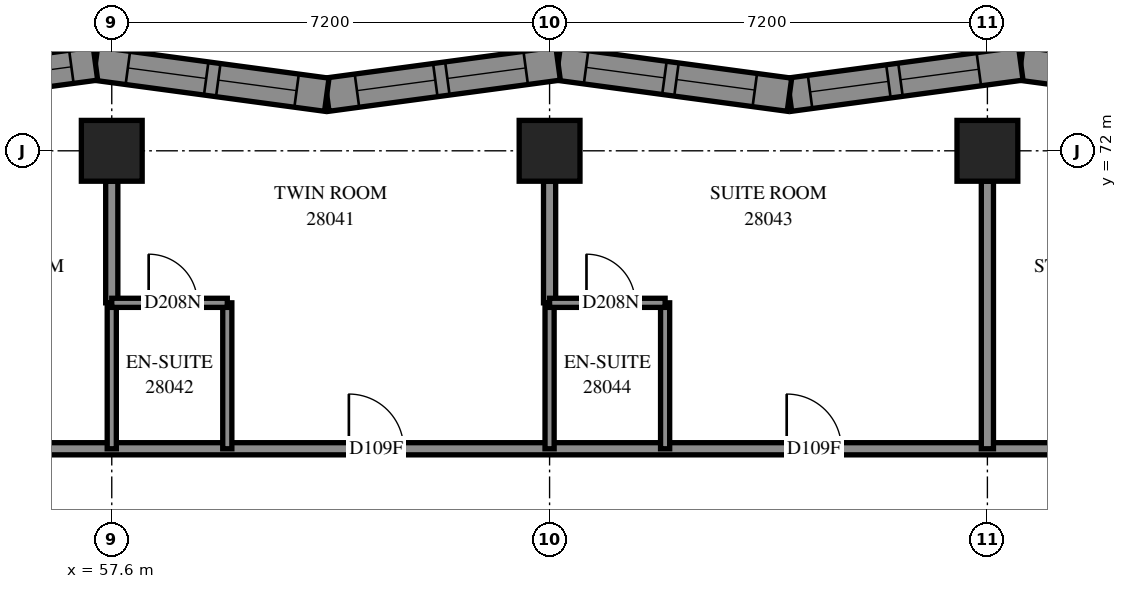
"""IFC4 building model, lengths in metres.
Left out: names, types, materials, properties, quantities, classifications, styles, units other than length and angle.
Written with IfcOpenShell. Run it as: python <this file> out.ifc"""

import sys

from ifc_helpers import new_model, si_unit, direction, frame, frame_2d, origin, origin_2d, place, context, subcontext, project, spatial, polyline, rectangle, outline, extrude, element, fill, save


model = new_model("IFC4")
c1 = context("Model", 3, precision=1e-05, world=origin(), true_north=direction((0.0, 1.0)))
c2 = subcontext(c1, "Body", "Model", "MODEL_VIEW")
j1 = project(units=[si_unit("LENGTHUNIT", "METRE"), si_unit("PLANEANGLEUNIT", "RADIAN")], contexts=[c1])
p1 = place(None, origin())
s1 = spatial("IfcSite", under=j1, at=p1, CompositionType="ELEMENT")
p2 = place(p1, origin())
s2 = spatial("IfcBuilding", under=s1, at=p2, CompositionType="ELEMENT")
p3 = place(p2, frame((0.0, 0.0, 105.0)))
s3 = spatial("IfcBuildingStorey", under=s2, at=p3, CompositionType="ELEMENT", Elevation=105.0)
for number, where, z_axis, x_axis in (
    (1, (57.6, 72.0, 0.0), (0.0, 0.0, 1.0), (1.0, 0.0, 0.0)),
    (2, (64.8, 72.0, 0.0), (0.0, 0.0, 1.0), (1.0, 0.0, 0.0)),
    (3, (72.0, 72.0, 0.0), (0.0, 0.0, 1.0), (1.0, 0.0, 0.0)),
):
    element("IfcColumn", number, at=place(p3, frame(where, z_axis=z_axis, x_axis=x_axis)), inside=s3, PredefinedType="COLUMN", context=c2, shape_type="SweptSolid", body=[
        extrude(rectangle(XDim=1.0, YDim=1.0, at=origin_2d()), origin(), (0.0, 0.0, 1.0), 3.1),
    ])
p4 = place(p3, frame((76.374, 72.92, 0.0), z_axis=(0.0, 0.0, 1.0), x_axis=(-0.9910665233, 0.1333684607, 0.0)))
e4 = element("IfcWall", 4, at=p4, inside=s3, PredefinedType="SOLIDWALL", context=c2, shape_type="SweptSolid", body=[
    extrude(outline(polyline([(0.058, -0.275), (3.897, -0.275), (3.823, 0.275), (-0.058, 0.275), (0.058, -0.275)])), origin(), (0.0, 0.0, 1.0), 3.1),
])
p5 = place(p4, frame((1.602, 0.0, 0.5)))
e5 = element("IfcOpeningElement", 5, at=p5, cuts=e4, PredefinedType="OPENING", context=c2, shape_type="SweptSolid", body=[
    extrude(rectangle(XDim=1.2, YDim=2.45, at=frame_2d((0.6, 1.225))), frame((0.0, 0.285, 0.0), z_axis=(0.0, -1.0, 0.0), x_axis=(1.0, 0.0, 0.0)), (0.0, 0.0, 1.0), 0.57),
])
p6 = place(p3, frame((72.549, 73.434, 0.0), z_axis=(0.0, 0.0, 1.0), x_axis=(-0.9910651652, -0.1333785524, 0.0)))
e6 = element("IfcWall", 6, at=p6, inside=s3, PredefinedType="SOLIDWALL", context=c2, shape_type="SweptSolid", body=[
    extrude(outline(polyline([(-0.037, -0.275), (3.802, -0.275), (3.876, 0.275), (0.037, 0.275), (-0.037, -0.275)])), origin(), (0.0, 0.0, 1.0), 3.1),
])
p7 = place(p6, frame((0.696, 0.0, 0.5)))
e7 = element("IfcOpeningElement", 7, at=p7, cuts=e6, PredefinedType="OPENING", context=c2, shape_type="SweptSolid", body=[
    extrude(rectangle(XDim=1.3, YDim=2.45, at=frame_2d((0.65, 1.225))), frame((0.0, 0.285, 0.0), z_axis=(0.0, -1.0, 0.0), x_axis=(1.0, 0.0, 0.0)), (0.0, 0.0, 1.0), 0.57),
])
p8 = place(p6, frame((2.196, 0.0, 0.5)))
e8 = element("IfcOpeningElement", 8, at=p8, cuts=e6, PredefinedType="OPENING", context=c2, shape_type="SweptSolid", body=[
    extrude(rectangle(XDim=1.3, YDim=2.45, at=frame_2d((0.65, 1.225))), frame((0.0, 0.285, 0.0), z_axis=(0.0, -1.0, 0.0), x_axis=(1.0, 0.0, 0.0)), (0.0, 0.0, 1.0), 0.57),
])
p9 = place(p3, frame((68.745, 72.922, 0.0), z_axis=(0.0, 0.0, 1.0), x_axis=(-0.9910647018, 0.133381996, 0.0)))
e9 = element("IfcWall", 9, at=p9, inside=s3, PredefinedType="SOLIDWALL", context=c2, shape_type="SweptSolid", body=[
    extrude(outline(polyline([(0.037, -0.275), (3.876, -0.275), (3.802, 0.275), (-0.037, 0.275), (0.037, -0.275)])), origin(), (0.0, 0.0, 1.0), 3.1),
])
p10 = place(p9, frame((0.575, 0.0, 0.5)))
e10 = element("IfcOpeningElement", 10, at=p10, cuts=e9, PredefinedType="OPENING", context=c2, shape_type="SweptSolid", body=[
    extrude(rectangle(XDim=1.3, YDim=2.45, at=frame_2d((0.65, 1.225))), frame((0.0, 0.285, 0.0), z_axis=(0.0, -1.0, 0.0), x_axis=(1.0, 0.0, 0.0)), (0.0, 0.0, 1.0), 0.57),
])
p11 = place(p9, frame((2.075, 0.0, 0.5)))
e11 = element("IfcOpeningElement", 11, at=p11, cuts=e9, PredefinedType="OPENING", context=c2, shape_type="SweptSolid", body=[
    extrude(rectangle(XDim=1.3, YDim=2.45, at=frame_2d((0.65, 1.225))), frame((0.0, 0.285, 0.0), z_axis=(0.0, -1.0, 0.0), x_axis=(1.0, 0.0, 0.0)), (0.0, 0.0, 1.0), 0.57),
])
p12 = place(p3, frame((64.94, 73.434, 0.0), z_axis=(0.0, 0.0, 1.0), x_axis=(-0.9910651652, -0.1333785524, 0.0)))
e12 = element("IfcWall", 12, at=p12, inside=s3, PredefinedType="SOLIDWALL", context=c2, shape_type="SweptSolid", body=[
    extrude(outline(polyline([(-0.037, -0.275), (3.802, -0.275), (3.876, 0.275), (0.037, 0.275), (-0.037, -0.275)])), origin(), (0.0, 0.0, 1.0), 3.1),
])
p13 = place(p12, frame((0.538, 0.0, 0.5)))
e13 = element("IfcOpeningElement", 13, at=p13, cuts=e12, PredefinedType="OPENING", context=c2, shape_type="SweptSolid", body=[
    extrude(rectangle(XDim=1.3, YDim=2.45, at=frame_2d((0.65, 1.225))), frame((0.0, 0.285, 0.0), z_axis=(0.0, -1.0, 0.0), x_axis=(1.0, 0.0, 0.0)), (0.0, 0.0, 1.0), 0.57),
])
p14 = place(p12, frame((2.038, 0.0, 0.5)))
e14 = element("IfcOpeningElement", 14, at=p14, cuts=e12, PredefinedType="OPENING", context=c2, shape_type="SweptSolid", body=[
    extrude(rectangle(XDim=1.3, YDim=2.45, at=frame_2d((0.65, 1.225))), frame((0.0, 0.285, 0.0), z_axis=(0.0, -1.0, 0.0), x_axis=(1.0, 0.0, 0.0)), (0.0, 0.0, 1.0), 0.57),
])
p15 = place(p3, frame((61.136, 72.922, 0.0), z_axis=(0.0, 0.0, 1.0), x_axis=(-0.9910647018, 0.133381996, 0.0)))
e15 = element("IfcWall", 15, at=p15, inside=s3, PredefinedType="SOLIDWALL", context=c2, shape_type="SweptSolid", body=[
    extrude(outline(polyline([(0.037, -0.275), (3.876, -0.275), (3.802, 0.275), (-0.037, 0.275), (0.037, -0.275)])), origin(), (0.0, 0.0, 1.0), 3.1),
])
p16 = place(p15, frame((0.501, 0.0, 0.5)))
e16 = element("IfcOpeningElement", 16, at=p16, cuts=e15, PredefinedType="OPENING", context=c2, shape_type="SweptSolid", body=[
    extrude(rectangle(XDim=1.3, YDim=2.45, at=frame_2d((0.65, 1.225))), frame((0.0, 0.285, 0.0), z_axis=(0.0, -1.0, 0.0), x_axis=(1.0, 0.0, 0.0)), (0.0, 0.0, 1.0), 0.57),
])
p17 = place(p15, frame((2.001, 0.0, 0.5)))
e17 = element("IfcOpeningElement", 17, at=p17, cuts=e15, PredefinedType="OPENING", context=c2, shape_type="SweptSolid", body=[
    extrude(rectangle(XDim=1.3, YDim=2.45, at=frame_2d((0.65, 1.225))), frame((0.0, 0.285, 0.0), z_axis=(0.0, -1.0, 0.0), x_axis=(1.0, 0.0, 0.0)), (0.0, 0.0, 1.0), 0.57),
])
p18 = place(p3, frame((57.332, 73.434, 0.0), z_axis=(0.0, 0.0, 1.0), x_axis=(-0.9910651652, -0.1333785524, 0.0)))
e18 = element("IfcWall", 18, at=p18, inside=s3, PredefinedType="SOLIDWALL", context=c2, shape_type="SweptSolid", body=[
    extrude(outline(polyline([(-0.037, -0.275), (3.802, -0.275), (3.876, 0.275), (0.037, 0.275), (-0.037, -0.275)])), origin(), (0.0, 0.0, 1.0), 3.1),
])
p19 = place(p18, frame((0.399, 0.0, 0.5)))
e19 = element("IfcOpeningElement", 19, at=p19, cuts=e18, PredefinedType="OPENING", context=c2, shape_type="SweptSolid", body=[
    extrude(rectangle(XDim=1.3, YDim=2.45, at=frame_2d((0.65, 1.225))), frame((0.0, 0.285, 0.0), z_axis=(0.0, -1.0, 0.0), x_axis=(1.0, 0.0, 0.0)), (0.0, 0.0, 1.0), 0.57),
])
p20 = place(p18, frame((1.899, 0.0, 0.5)))
e20 = element("IfcOpeningElement", 20, at=p20, cuts=e18, PredefinedType="OPENING", context=c2, shape_type="SweptSolid", body=[
    extrude(rectangle(XDim=1.3, YDim=2.45, at=frame_2d((0.65, 1.225))), frame((0.0, 0.285, 0.0), z_axis=(0.0, -1.0, 0.0), x_axis=(1.0, 0.0, 0.0)), (0.0, 0.0, 1.0), 0.57),
])
p21 = place(p3, frame((55.3, 67.1, 0.0), z_axis=(0.0, 0.0, 1.0), x_axis=(1.0, 0.0, 0.0)))
e21 = element("IfcWall", 21, at=p21, inside=s3, PredefinedType="PARTITIONING", context=c2, shape_type="SweptSolid", body=[
    extrude(rectangle(XDim=19.0, YDim=0.2, at=frame_2d((9.5, 0.0))), origin(), (0.0, 0.0, 1.0), 3.1),
])
p22 = place(p21, frame((6.199, 0.0, 0.0)))
e22 = element("IfcOpeningElement", 22, at=p22, cuts=e21, PredefinedType="OPENING", context=c2, shape_type="SweptSolid", body=[
    extrude(rectangle(XDim=0.9, YDim=2.1, at=frame_2d((0.45, 1.05))), frame((0.0, 0.11, 0.0), z_axis=(0.0, -1.0, 0.0), x_axis=(1.0, 0.0, 0.0)), (0.0, 0.0, 1.0), 0.22),
])
p23 = place(p21, frame((13.399, 0.0, 0.0)))
e23 = element("IfcOpeningElement", 23, at=p23, cuts=e21, PredefinedType="OPENING", context=c2, shape_type="SweptSolid", body=[
    extrude(rectangle(XDim=0.9, YDim=2.1, at=frame_2d((0.45, 1.05))), frame((0.0, 0.11, 0.0), z_axis=(0.0, -1.0, 0.0), x_axis=(1.0, 0.0, 0.0)), (0.0, 0.0, 1.0), 0.22),
])
p24 = place(p3, frame((72.0, 67.1, 0.0), z_axis=(0.0, 0.0, 1.0), x_axis=(0.0, 1.0, 0.0)))
e24 = element("IfcWall", 24, at=p24, inside=s3, PredefinedType="PARTITIONING", context=c2, shape_type="SweptSolid", body=[
    extrude(rectangle(XDim=4.4, YDim=0.2, at=frame_2d((2.2, 0.0))), origin(), (0.0, 0.0, 1.0), 3.1),
])
for number, where, z_axis, x_axis in (
    (25, (59.5, 67.1, 0.0), (0.0, 0.0, 1.0), (0.0, 1.0, 0.0)),
    (26, (57.6, 67.1, 0.0), (0.0, 0.0, 1.0), (0.0, 1.0, 0.0)),
    (27, (64.8, 67.1, 0.0), (0.0, 0.0, 1.0), (0.0, 1.0, 0.0)),
    (28, (66.7, 67.1, 0.0), (0.0, 0.0, 1.0), (0.0, 1.0, 0.0)),
):
    element("IfcWall", number, at=place(p3, frame(where, z_axis=z_axis, x_axis=x_axis)), inside=s3, PredefinedType="PARTITIONING", context=c2, shape_type="SweptSolid", body=[
        extrude(rectangle(XDim=2.4, YDim=0.15, at=frame_2d((1.2, 0.0))), origin(), (0.0, 0.0, 1.0), 3.1),
    ])
for number, where, z_axis, x_axis in (
    (29, (57.6, 69.5, 0.0), (0.0, 0.0, 1.0), (0.0, 1.0, 0.0)),
    (30, (64.8, 69.5, 0.0), (0.0, 0.0, 1.0), (0.0, 1.0, 0.0)),
):
    element("IfcWall", number, at=place(p3, frame(where, z_axis=z_axis, x_axis=x_axis)), inside=s3, PredefinedType="PARTITIONING", context=c2, shape_type="SweptSolid", body=[
        extrude(rectangle(XDim=2.0, YDim=0.2, at=frame_2d((1.0, 0.0))), origin(), (0.0, 0.0, 1.0), 3.1),
    ])
p25 = place(p3, frame((64.8, 69.5, 0.0), z_axis=(0.0, 0.0, 1.0), x_axis=(1.0, 0.0, 0.0)))
e31 = element("IfcWall", 31, at=p25, inside=s3, PredefinedType="PARTITIONING", context=c2, shape_type="SweptSolid", body=[
    extrude(rectangle(XDim=1.9, YDim=0.15, at=frame_2d((0.95, 0.0))), origin(), (0.0, 0.0, 1.0), 3.1),
])
p26 = place(p25, frame((0.607, 0.0, 0.0)))
e32 = element("IfcOpeningElement", 32, at=p26, cuts=e31, PredefinedType="OPENING", context=c2, shape_type="SweptSolid", body=[
    extrude(rectangle(XDim=0.8, YDim=2.1, at=frame_2d((0.4, 1.05))), frame((0.0, 0.085, 0.0), z_axis=(0.0, -1.0, 0.0), x_axis=(1.0, 0.0, 0.0)), (0.0, 0.0, 1.0), 0.17),
])
p27 = place(p3, frame((57.6, 69.5, 0.0), z_axis=(0.0, 0.0, 1.0), x_axis=(1.0, 0.0, 0.0)))
e33 = element("IfcWall", 33, at=p27, inside=s3, PredefinedType="PARTITIONING", context=c2, shape_type="SweptSolid", body=[
    extrude(rectangle(XDim=1.9, YDim=0.15, at=frame_2d((0.95, 0.0))), origin(), (0.0, 0.0, 1.0), 3.1),
])
p28 = place(p27, frame((0.607, 0.0, 0.0)))
e34 = element("IfcOpeningElement", 34, at=p28, cuts=e33, PredefinedType="OPENING", context=c2, shape_type="SweptSolid", body=[
    extrude(rectangle(XDim=0.8, YDim=2.1, at=frame_2d((0.4, 1.05))), frame((0.0, 0.085, 0.0), z_axis=(0.0, -1.0, 0.0), x_axis=(1.0, 0.0, 0.0)), (0.0, 0.0, 1.0), 0.17),
])
p29 = place(p7, origin())
e35 = element("IfcWindow", 35, at=p29, inside=s3, PartitioningType="SINGLE_PANEL", PredefinedType="WINDOW", context=c2, shape_type="SweptSolid", body=[
    extrude(rectangle(XDim=1.3, YDim=2.45, at=frame_2d((0.65, 1.225))), frame((0.0, 0.155, 0.0), z_axis=(0.0, -1.0, 0.0), x_axis=(1.0, 0.0, 0.0)), (0.0, 0.0, 1.0), 0.06),
])
fill(e7, e35)
p30 = place(p8, origin())
e36 = element("IfcWindow", 36, at=p30, inside=s3, PartitioningType="SINGLE_PANEL", PredefinedType="WINDOW", context=c2, shape_type="SweptSolid", body=[
    extrude(rectangle(XDim=1.3, YDim=2.45, at=frame_2d((0.65, 1.225))), frame((0.0, 0.155, 0.0), z_axis=(0.0, -1.0, 0.0), x_axis=(1.0, 0.0, 0.0)), (0.0, 0.0, 1.0), 0.06),
])
fill(e8, e36)
p31 = place(p10, origin())
e37 = element("IfcWindow", 37, at=p31, inside=s3, PartitioningType="SINGLE_PANEL", PredefinedType="WINDOW", context=c2, shape_type="SweptSolid", body=[
    extrude(rectangle(XDim=1.3, YDim=2.45, at=frame_2d((0.65, 1.225))), frame((0.0, 0.155, 0.0), z_axis=(0.0, -1.0, 0.0), x_axis=(1.0, 0.0, 0.0)), (0.0, 0.0, 1.0), 0.06),
])
fill(e10, e37)
p32 = place(p11, origin())
e38 = element("IfcWindow", 38, at=p32, inside=s3, PartitioningType="SINGLE_PANEL", PredefinedType="WINDOW", context=c2, shape_type="SweptSolid", body=[
    extrude(rectangle(XDim=1.3, YDim=2.45, at=frame_2d((0.65, 1.225))), frame((0.0, 0.155, 0.0), z_axis=(0.0, -1.0, 0.0), x_axis=(1.0, 0.0, 0.0)), (0.0, 0.0, 1.0), 0.06),
])
fill(e11, e38)
p33 = place(p13, origin())
e39 = element("IfcWindow", 39, at=p33, inside=s3, PartitioningType="SINGLE_PANEL", PredefinedType="WINDOW", context=c2, shape_type="SweptSolid", body=[
    extrude(rectangle(XDim=1.3, YDim=2.45, at=frame_2d((0.65, 1.225))), frame((0.0, 0.155, 0.0), z_axis=(0.0, -1.0, 0.0), x_axis=(1.0, 0.0, 0.0)), (0.0, 0.0, 1.0), 0.06),
])
fill(e13, e39)
p34 = place(p14, origin())
e40 = element("IfcWindow", 40, at=p34, inside=s3, PartitioningType="SINGLE_PANEL", PredefinedType="WINDOW", context=c2, shape_type="SweptSolid", body=[
    extrude(rectangle(XDim=1.3, YDim=2.45, at=frame_2d((0.65, 1.225))), frame((0.0, 0.155, 0.0), z_axis=(0.0, -1.0, 0.0), x_axis=(1.0, 0.0, 0.0)), (0.0, 0.0, 1.0), 0.06),
])
fill(e14, e40)
p35 = place(p16, origin())
e41 = element("IfcWindow", 41, at=p35, inside=s3, PartitioningType="SINGLE_PANEL", PredefinedType="WINDOW", context=c2, shape_type="SweptSolid", body=[
    extrude(rectangle(XDim=1.3, YDim=2.45, at=frame_2d((0.65, 1.225))), frame((0.0, 0.155, 0.0), z_axis=(0.0, -1.0, 0.0), x_axis=(1.0, 0.0, 0.0)), (0.0, 0.0, 1.0), 0.06),
])
fill(e16, e41)
p36 = place(p17, origin())
e42 = element("IfcWindow", 42, at=p36, inside=s3, PartitioningType="SINGLE_PANEL", PredefinedType="WINDOW", context=c2, shape_type="SweptSolid", body=[
    extrude(rectangle(XDim=1.3, YDim=2.45, at=frame_2d((0.65, 1.225))), frame((0.0, 0.155, 0.0), z_axis=(0.0, -1.0, 0.0), x_axis=(1.0, 0.0, 0.0)), (0.0, 0.0, 1.0), 0.06),
])
fill(e17, e42)
p37 = place(p19, origin())
e43 = element("IfcWindow", 43, at=p37, inside=s3, PartitioningType="SINGLE_PANEL", PredefinedType="WINDOW", context=c2, shape_type="SweptSolid", body=[
    extrude(rectangle(XDim=1.3, YDim=2.45, at=frame_2d((0.65, 1.225))), frame((0.0, 0.155, 0.0), z_axis=(0.0, -1.0, 0.0), x_axis=(1.0, 0.0, 0.0)), (0.0, 0.0, 1.0), 0.06),
])
fill(e19, e43)
p38 = place(p22, origin())
e44 = element("IfcDoor", 44, at=p38, inside=s3, OperationType="SINGLE_SWING_RIGHT", PredefinedType="DOOR", context=c2, shape_type="SweptSolid", body=[
    extrude(rectangle(XDim=0.9, YDim=2.1, at=frame_2d((0.45, 1.05))), frame((0.0, 0.025, 0.0), z_axis=(0.0, -1.0, 0.0), x_axis=(1.0, 0.0, 0.0)), (0.0, 0.0, 1.0), 0.05),
])
fill(e22, e44)
p39 = place(p28, origin())
e45 = element("IfcDoor", 45, at=p39, inside=s3, OperationType="SINGLE_SWING_RIGHT", PredefinedType="DOOR", context=c2, shape_type="SweptSolid", body=[
    extrude(rectangle(XDim=0.8, YDim=2.1, at=frame_2d((0.4, 1.05))), frame((0.0, 0.025, 0.0), z_axis=(0.0, -1.0, 0.0), x_axis=(1.0, 0.0, 0.0)), (0.0, 0.0, 1.0), 0.05),
])
fill(e34, e45)
p40 = place(p23, origin())
e46 = element("IfcDoor", 46, at=p40, inside=s3, OperationType="SINGLE_SWING_RIGHT", PredefinedType="DOOR", context=c2, shape_type="SweptSolid", body=[
    extrude(rectangle(XDim=0.9, YDim=2.1, at=frame_2d((0.45, 1.05))), frame((0.0, 0.025, 0.0), z_axis=(0.0, -1.0, 0.0), x_axis=(1.0, 0.0, 0.0)), (0.0, 0.0, 1.0), 0.05),
])
fill(e23, e46)
p41 = place(p26, origin())
e47 = element("IfcDoor", 47, at=p41, inside=s3, OperationType="SINGLE_SWING_RIGHT", PredefinedType="DOOR", context=c2, shape_type="SweptSolid", body=[
    extrude(rectangle(XDim=0.8, YDim=2.1, at=frame_2d((0.4, 1.05))), frame((0.0, 0.025, 0.0), z_axis=(0.0, -1.0, 0.0), x_axis=(1.0, 0.0, 0.0)), (0.0, 0.0, 1.0), 0.05),
])
fill(e32, e47)
save(model, sys.argv[1])
